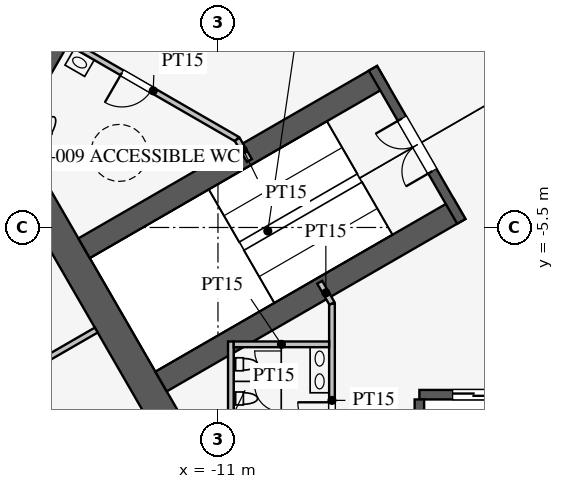
"""IFC4 building model, lengths in metres.
Left out: names, types, materials, properties, quantities, classifications, styles, units other than length and angle.
Written with IfcOpenShell. Run it as: python <this file> out.ifc"""

import sys

from ifc_helpers import new_model, si_unit, direction, frame, frame_2d, origin, place, context, subcontext, project, spatial, rectangle, extrude, element, fill, save


model = new_model("IFC4")
c1 = context("Model", 3, precision=1e-05, world=origin(), true_north=direction((0.0, 1.0)))
c2 = subcontext(c1, "Body", "Model", "MODEL_VIEW")
j1 = project(units=[si_unit("LENGTHUNIT", "METRE"), si_unit("PLANEANGLEUNIT", "RADIAN")], contexts=[c1])
p1 = place(None, origin())
s1 = spatial("IfcSite", under=j1, at=p1, CompositionType="ELEMENT")
p2 = place(p1, origin())
s2 = spatial("IfcBuilding", under=s1, at=p2, CompositionType="ELEMENT")
p3 = place(p2, frame((0.0, 0.0, 37.5)))
s3 = spatial("IfcBuildingStorey", under=s2, at=p3, CompositionType="ELEMENT", Elevation=37.5)
p4 = place(p3, frame((-5.773, 16.0, 0.0), z_axis=(0.0, 0.0, 1.0), x_axis=(-0.500002442456, -0.866023993627, 0.0)))
e1 = element("IfcWall", 1, at=p4, inside=s3, PredefinedType="SHEAR", context=c2, shape_type="SweptSolid", body=[
    extrude(rectangle(XDim=21.939, YDim=0.8, at=frame_2d((10.97, 0.0))), origin(), (0.0, 0.0, 1.0), 4.2),
])
p5 = place(p4, frame((17.27, 0.0, 0.0)))
e2 = element("IfcOpeningElement", 2, at=p5, cuts=e1, PredefinedType="OPENING", context=c2, shape_type="SweptSolid", body=[
    extrude(rectangle(XDim=1.2, YDim=2.1, at=frame_2d((0.6, 1.05))), frame((0.0, 0.41, 0.0), z_axis=(0.0, -1.0, 0.0), x_axis=(1.0, 0.0, 0.0)), (0.0, 0.0, 1.0), 0.82),
])
p6 = place(p4, frame((3.47, 0.0, 0.0)))
e3 = element("IfcOpeningElement", 3, at=p6, cuts=e1, PredefinedType="OPENING", context=c2, shape_type="SweptSolid", body=[
    extrude(rectangle(XDim=1.2, YDim=2.1, at=frame_2d((0.6, 1.05))), frame((0.0, 0.41, 0.0), z_axis=(0.0, -1.0, 0.0), x_axis=(1.0, 0.0, 0.0)), (0.0, 0.0, 1.0), 0.82),
])
p7 = place(p3, frame((-16.743, -3.0, 0.0), z_axis=(0.0, 0.0, 1.0), x_axis=(0.499995765644, -0.866027848477, 0.0)))
e4 = element("IfcWall", 4, at=p7, inside=s3, PredefinedType="SHEAR", context=c2, shape_type="SweptSolid", body=[
    extrude(rectangle(XDim=11.547, YDim=0.8, at=frame_2d((5.773, 0.0))), origin(), (0.0, 0.0, 1.0), 4.2),
])
p8 = place(p3, frame((-5.7, -9.9, 0.0), z_axis=(0.0, 0.0, 1.0), x_axis=(1.0, 0.0, 0.0)))
e5 = element("IfcWall", 5, at=p8, inside=s3, PredefinedType="SHEAR", context=c2, shape_type="SweptSolid", body=[
    extrude(rectangle(XDim=11.4, YDim=0.25, at=frame_2d((5.7, 0.0))), origin(), (0.0, 0.0, 1.0), 4.2),
])
p9 = place(p8, frame((0.875, 0.0, 0.0)))
e6 = element("IfcOpeningElement", 6, at=p9, cuts=e5, PredefinedType="OPENING", context=c2, shape_type="SweptSolid", body=[
    extrude(rectangle(XDim=1.1, YDim=2.2, at=frame_2d((0.55, 1.1))), frame((0.0, 0.135, 0.0), z_axis=(0.0, -1.0, 0.0), x_axis=(1.0, 0.0, 0.0)), (0.0, 0.0, 1.0), 0.27),
])
p10 = place(p8, frame((3.725, 0.0, 0.0)))
e7 = element("IfcOpeningElement", 7, at=p10, cuts=e5, PredefinedType="OPENING", context=c2, shape_type="SweptSolid", body=[
    extrude(rectangle(XDim=1.1, YDim=2.2, at=frame_2d((0.55, 1.1))), frame((0.0, 0.135, 0.0), z_axis=(0.0, -1.0, 0.0), x_axis=(1.0, 0.0, 0.0)), (0.0, 0.0, 1.0), 0.27),
])
p11 = place(p8, frame((6.575, 0.0, 0.0)))
e8 = element("IfcOpeningElement", 8, at=p11, cuts=e5, PredefinedType="OPENING", context=c2, shape_type="SweptSolid", body=[
    extrude(rectangle(XDim=1.1, YDim=2.2, at=frame_2d((0.55, 1.1))), frame((0.0, 0.135, 0.0), z_axis=(0.0, -1.0, 0.0), x_axis=(1.0, 0.0, 0.0)), (0.0, 0.0, 1.0), 0.27),
])
p12 = place(p8, frame((9.425, 0.0, 0.0)))
e9 = element("IfcOpeningElement", 9, at=p12, cuts=e5, PredefinedType="OPENING", context=c2, shape_type="SweptSolid", body=[
    extrude(rectangle(XDim=1.1, YDim=2.2, at=frame_2d((0.55, 1.1))), frame((0.0, 0.135, 0.0), z_axis=(0.0, -1.0, 0.0), x_axis=(1.0, 0.0, 0.0)), (0.0, 0.0, 1.0), 0.27),
])
p13 = place(p3, frame((-5.7, -10.025, 0.0), z_axis=(0.0, 0.0, 1.0), x_axis=(0.0, -1.0, 0.0)))
e10 = element("IfcWall", 10, at=p13, inside=s3, PredefinedType="SHEAR", context=c2, shape_type="SweptSolid", body=[
    extrude(rectangle(XDim=2.575, YDim=0.25, at=frame_2d((1.288, 0.0))), origin(), (0.0, 0.0, 1.0), 4.2),
])
for number, where, z_axis, x_axis in (
    (11, (-6.663, -1.509, 0.0), (0.0, 0.0, 1.0), (-0.866, -0.5, 0.0)),
    (12, (-4.638, -5.016, 0.0), (0.0, 0.0, 1.0), (-0.866, -0.5, 0.0)),
):
    element("IfcWall", number, at=place(p3, frame(where, z_axis=z_axis, x_axis=x_axis)), inside=s3, PredefinedType="SHEAR", context=c2, shape_type="SweptSolid", body=[
        extrude(rectangle(XDim=9.075, YDim=0.6, at=frame_2d((4.538, 0.0))), origin(), (0.0, 0.0, 1.0), 4.2),
    ])
p14 = place(p3, frame((-6.922, -1.312, 0.0), z_axis=(0.0, 0.0, 1.0), x_axis=(0.499984536904, -0.866034331223, 0.0)))
e13 = element("IfcWall", 13, at=p14, inside=s3, PredefinedType="SHEAR", context=c2, shape_type="SweptSolid", body=[
    extrude(rectangle(XDim=4.65, YDim=0.25, at=frame_2d((2.325, 0.0))), origin(), (0.0, 0.0, 1.0), 4.2),
])
p15 = place(p14, frame((1.525, 0.0, 0.0)))
e14 = element("IfcOpeningElement", 14, at=p15, cuts=e13, PredefinedType="OPENING", context=c2, shape_type="SweptSolid", body=[
    extrude(rectangle(XDim=1.6, YDim=2.1, at=frame_2d((0.8, 1.05))), frame((0.0, 0.135, 0.0), z_axis=(0.0, -1.0, 0.0), x_axis=(1.0, 0.0, 0.0)), (0.0, 0.0, 1.0), 0.27),
])
p16 = place(p3, frame((-8.0, -7.5, 0.0), z_axis=(0.0, 0.0, 1.0), x_axis=(0.0, -1.0, 0.0)))
e15 = element("IfcWall", 15, at=p16, inside=s3, PredefinedType="PARTITIONING", context=c2, shape_type="SweptSolid", body=[
    extrude(rectangle(XDim=5.1, YDim=0.15, at=frame_2d((2.55, 0.0))), origin(), (0.0, 0.0, 1.0), 4.0),
])
p17 = place(p16, frame((2.6, 0.0, 0.0)))
e16 = element("IfcOpeningElement", 16, at=p17, cuts=e15, PredefinedType="OPENING", context=c2, shape_type="SweptSolid", body=[
    extrude(rectangle(XDim=0.9, YDim=2.1, at=frame_2d((0.45, 1.05))), frame((0.0, 0.085, 0.0), z_axis=(0.0, -1.0, 0.0), x_axis=(1.0, 0.0, 0.0)), (0.0, 0.0, 1.0), 0.17),
])
p18 = place(p3, frame((-10.495, -3.178, 0.0), z_axis=(0.0, 0.0, 1.0), x_axis=(-0.86602216432, 0.500005610874, 0.0)))
e17 = element("IfcWall", 17, at=p18, inside=s3, PredefinedType="PARTITIONING", context=c2, shape_type="SweptSolid", body=[
    extrude(rectangle(XDim=5.1, YDim=0.15, at=frame_2d((2.55, 0.0))), origin(), (0.0, 0.0, 1.0), 4.0),
])
p19 = place(p18, frame((2.6, 0.0, 0.0)))
e18 = element("IfcOpeningElement", 18, at=p19, cuts=e17, PredefinedType="OPENING", context=c2, shape_type="SweptSolid", body=[
    extrude(rectangle(XDim=0.9, YDim=2.1, at=frame_2d((0.45, 1.05))), frame((0.0, 0.085, 0.0), z_axis=(0.0, -1.0, 0.0), x_axis=(1.0, 0.0, 0.0)), (0.0, 0.0, 1.0), 0.17),
])
for number, where, z_axis, x_axis in (
    (19, (-10.495, -3.178, 0.0), (0.0, 0.0, 1.0), (0.5, -0.866, 0.0)),
    (20, (-8.0, -7.5, 0.0), (0.0, 0.0, 1.0), (-0.5, 0.866, 0.0)),
):
    element("IfcWall", number, at=place(p3, frame(where, z_axis=z_axis, x_axis=x_axis)), inside=s3, PredefinedType="PARTITIONING", context=c2, shape_type="SweptSolid", body=[
        extrude(rectangle(XDim=0.645, YDim=0.15, at=frame_2d((0.323, 0.0))), origin(), (0.0, 0.0, 1.0), 4.0),
    ])
p20 = place(p3, frame((-10.66, -8.5, 0.0), z_axis=(0.0, 0.0, 1.0), x_axis=(0.0, -1.0, 0.0)))
e21 = element("IfcWall", 21, at=p20, inside=s3, PredefinedType="PARTITIONING", context=c2, shape_type="SweptSolid", body=[
    extrude(rectangle(XDim=4.1, YDim=0.15, at=frame_2d((2.05, 0.0))), origin(), (0.0, 0.0, 1.0), 4.0),
])
p21 = place(p3, frame((-8.075, -8.575, 0.0), z_axis=(0.0, 0.0, 1.0), x_axis=(-1.0, 0.0, 0.0)))
e22 = element("IfcWall", 22, at=p21, inside=s3, PredefinedType="PARTITIONING", context=c2, shape_type="SweptSolid", body=[
    extrude(rectangle(XDim=2.51, YDim=0.15, at=frame_2d((1.255, 0.0))), origin(), (0.0, 0.0, 1.0), 4.0),
])
p22 = place(p3, frame((-14.203, -8.2, 0.0), z_axis=(0.0, 0.0, 1.0), x_axis=(-0.866024965723, -0.500000758745, 0.0)))
e23 = element("IfcWall", 23, at=p22, inside=s3, PredefinedType="PARTITIONING", context=c2, shape_type="SweptSolid", body=[
    extrude(rectangle(XDim=18.25, YDim=0.15, at=frame_2d((9.125, 0.0))), origin(), (0.0, 0.0, 1.0), 2.3),
])
p23 = place(p17, frame((0.9, 0.0, 0.0), z_axis=(0.0, 0.0, 1.0), x_axis=(-1.0, 0.0, 0.0)))
e24 = element("IfcDoor", 24, at=p23, inside=s3, OperationType="SINGLE_SWING_RIGHT", PredefinedType="DOOR", context=c2, shape_type="SweptSolid", body=[
    extrude(rectangle(XDim=0.9, YDim=2.1, at=frame_2d((0.45, 1.05))), frame((0.0, 0.025, 0.0), z_axis=(0.0, -1.0, 0.0), x_axis=(1.0, 0.0, 0.0)), (0.0, 0.0, 1.0), 0.05),
])
fill(e16, e24)
p24 = place(p19, origin())
e25 = element("IfcDoor", 25, at=p24, inside=s3, OperationType="SINGLE_SWING_RIGHT", PredefinedType="DOOR", context=c2, shape_type="SweptSolid", body=[
    extrude(rectangle(XDim=0.9, YDim=2.1, at=frame_2d((0.45, 1.05))), frame((0.0, 0.025, 0.0), z_axis=(0.0, -1.0, 0.0), x_axis=(1.0, 0.0, 0.0)), (0.0, 0.0, 1.0), 0.05),
])
fill(e18, e25)
p25 = place(p15, frame((1.6, 0.0, 0.0), z_axis=(0.0, 0.0, 1.0), x_axis=(-1.0, 0.0, 0.0)))
e26 = element("IfcDoor", 26, at=p25, inside=s3, OperationType="DOUBLE_DOOR_SINGLE_SWING", PredefinedType="DOOR", context=c2, shape_type="SweptSolid", body=[
    extrude(rectangle(XDim=1.6, YDim=2.1, at=frame_2d((0.8, 1.05))), frame((0.0, 0.025, 0.0), z_axis=(0.0, -1.0, 0.0), x_axis=(1.0, 0.0, 0.0)), (0.0, 0.0, 1.0), 0.05),
])
fill(e14, e26)
p26 = place(p9, origin())
e27 = element("IfcDoor", 27, at=p26, inside=s3, OperationType="DOUBLE_DOOR_SLIDING", PredefinedType="DOOR", context=c2, shape_type="SweptSolid", body=[
    extrude(rectangle(XDim=1.1, YDim=2.2, at=frame_2d((0.55, 1.1))), frame((0.0, 0.025, 0.0), z_axis=(0.0, -1.0, 0.0), x_axis=(1.0, 0.0, 0.0)), (0.0, 0.0, 1.0), 0.05),
])
fill(e6, e27)
save(model, sys.argv[1])
